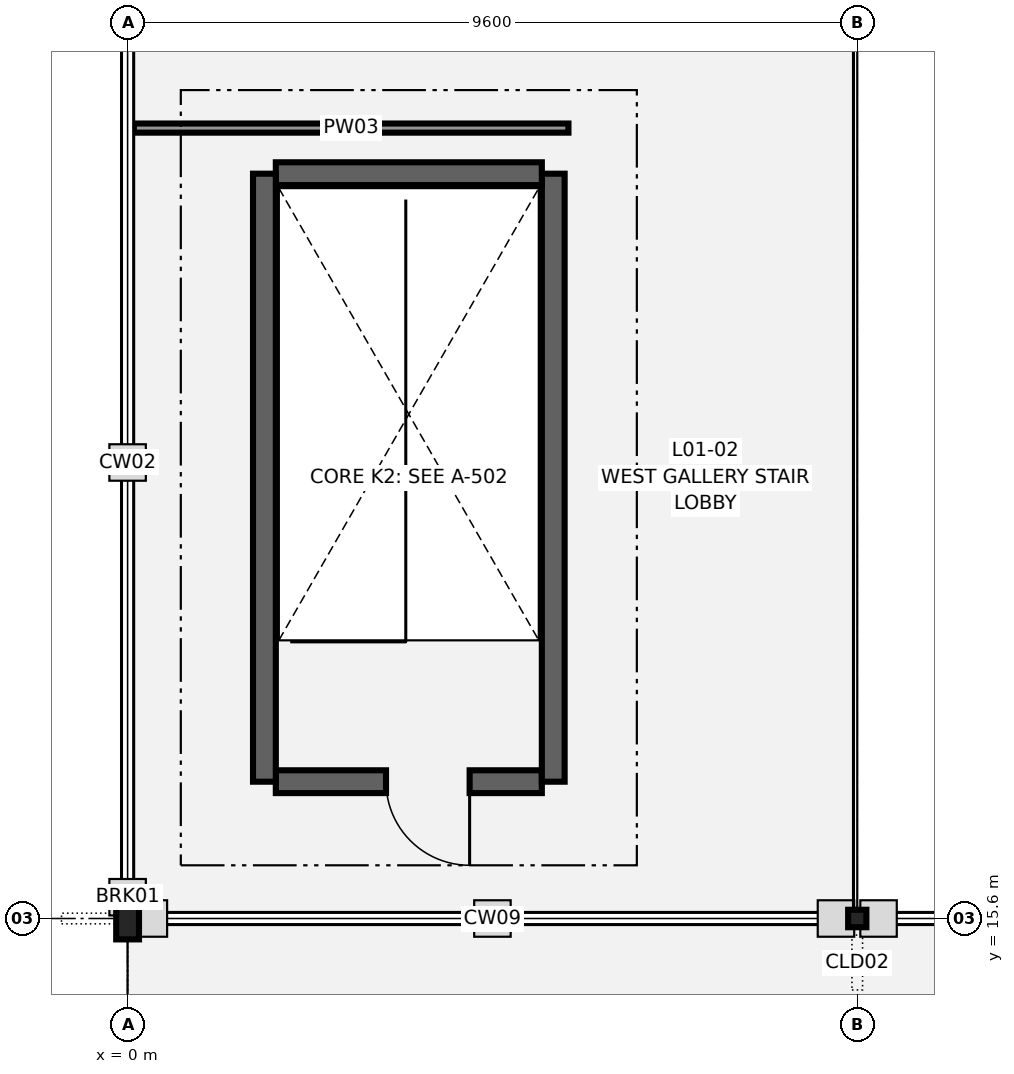
"""IFC4 building model, lengths in metres.
Left out: names, types, materials, properties, quantities, classifications, styles, units other than length and angle.
Written with IfcOpenShell. Run it as: python <this file> out.ifc"""

import sys

from ifc_helpers import new_model, si_unit, direction, frame, frame_2d, origin, origin_2d, place, context, subcontext, project, spatial, rectangle, i_section, extrude, element, fill, save


model = new_model("IFC4")
c1 = context("Model", 3, precision=1e-05, world=origin(), true_north=direction((0.0, 1.0)))
c2 = subcontext(c1, "Body", "Model", "MODEL_VIEW")
j1 = project(units=[si_unit("LENGTHUNIT", "METRE"), si_unit("PLANEANGLEUNIT", "RADIAN")], contexts=[c1])
p1 = place(None, origin())
s1 = spatial("IfcSite", under=j1, at=p1, CompositionType="ELEMENT")
p2 = place(p1, origin())
s2 = spatial("IfcBuilding", under=s1, at=p2, CompositionType="ELEMENT")
p3 = place(p2, frame((0.0, 0.0, 5.4)))
s3 = spatial("IfcBuildingStorey", under=s2, at=p3, CompositionType="ELEMENT", Elevation=5.4)
p4 = place(p3, frame((0.0, 15.6, 0.0), z_axis=(0.0, 0.0, 1.0), x_axis=(1.0, 0.0, 0.0)))
e1 = element("IfcColumn", 1, at=p4, inside=s3, PredefinedType="COLUMN", context=c2, shape_type="SweptSolid", body=[
    extrude(i_section(OverallWidth=0.3, OverallDepth=0.55, WebThickness=0.015, FlangeThickness=0.029, FilletRadius=0.027, at=origin_2d()), origin(), (0.0, 0.0, 1.0), 4.8),
])
p5 = place(p3, frame((9.6, 15.6, 0.0), z_axis=(0.0, 0.0, 1.0), x_axis=(1.0, 0.0, 0.0)))
e2 = element("IfcColumn", 2, at=p5, inside=s3, PredefinedType="COLUMN", context=c2, shape_type="SweptSolid", body=[
    extrude(i_section(OverallWidth=0.24, OverallDepth=0.23, WebThickness=0.008, FlangeThickness=0.012, FilletRadius=0.021, at=origin_2d()), origin(), (0.0, 0.0, 1.0), 4.8),
])
p6 = place(p3, frame((5.45, 17.4, 0.0), z_axis=(0.0, 0.0, 1.0), x_axis=(-1.0, 0.0, 0.0)))
e3 = element("IfcWall", 3, at=p6, inside=s3, PredefinedType="SHEAR", context=c2, shape_type="SweptSolid", body=[
    extrude(rectangle(XDim=3.5, YDim=0.3, at=frame_2d((1.75, 0.0))), origin(), (0.0, 0.0, 1.0), 4.5),
])
p7 = place(p6, frame((0.95, 0.0, 0.0)))
e4 = element("IfcOpeningElement", 4, at=p7, cuts=e3, PredefinedType="OPENING", context=c2, shape_type="SweptSolid", body=[
    extrude(rectangle(XDim=1.1, YDim=2.15, at=frame_2d((0.55, 1.075))), frame((0.0, 0.16, 0.0), z_axis=(0.0, -1.0, 0.0), x_axis=(1.0, 0.0, 0.0)), (0.0, 0.0, 1.0), 0.32),
])
p8 = place(p3, frame((5.6, 17.4, 0.0), z_axis=(0.0, 0.0, 1.0), x_axis=(0.0, 1.0, 0.0)))
e5 = element("IfcWall", 5, at=p8, inside=s3, PredefinedType="SHEAR", context=c2, shape_type="SweptSolid", body=[
    extrude(rectangle(XDim=8.0, YDim=0.3, at=frame_2d((4.0, 0.0))), origin(), (0.0, 0.0, 1.0), 4.5),
])
p9 = place(p3, frame((5.45, 25.4, 0.0), z_axis=(0.0, 0.0, 1.0), x_axis=(-1.0, 0.0, 0.0)))
e6 = element("IfcWall", 6, at=p9, inside=s3, PredefinedType="SHEAR", context=c2, shape_type="SweptSolid", body=[
    extrude(rectangle(XDim=3.5, YDim=0.3, at=frame_2d((1.75, 0.0))), origin(), (0.0, 0.0, 1.0), 4.5),
])
p10 = place(p3, frame((1.8, 25.4, 0.0), z_axis=(0.0, 0.0, 1.0), x_axis=(0.0, -1.0, 0.0)))
e7 = element("IfcWall", 7, at=p10, inside=s3, PredefinedType="SHEAR", context=c2, shape_type="SweptSolid", body=[
    extrude(rectangle(XDim=8.0, YDim=0.3, at=frame_2d((4.0, 0.0))), origin(), (0.0, 0.0, 1.0), 4.5),
])
p11 = place(p3, frame((0.082, 26.0, 0.0), z_axis=(0.0, 0.0, 1.0), x_axis=(1.0, 0.0, 0.0)))
e8 = element("IfcWall", 8, at=p11, inside=s3, PredefinedType="PARTITIONING", context=c2, shape_type="SweptSolid", body=[
    extrude(rectangle(XDim=5.718, YDim=0.12, at=frame_2d((2.859, 0.0))), origin(), (0.0, 0.0, 1.0), 1.2),
])
p12 = place(p7, origin())
e9 = element("IfcDoor", 9, at=p12, inside=s3, OperationType="SINGLE_SWING_LEFT", PredefinedType="DOOR", context=c2, shape_type="SweptSolid", body=[
    extrude(rectangle(XDim=1.1, YDim=2.15, at=frame_2d((0.55, 1.075))), frame((0.0, 0.025, 0.0), z_axis=(0.0, -1.0, 0.0), x_axis=(1.0, 0.0, 0.0)), (0.0, 0.0, 1.0), 0.05),
])
fill(e4, e9)
save(model, sys.argv[1])
